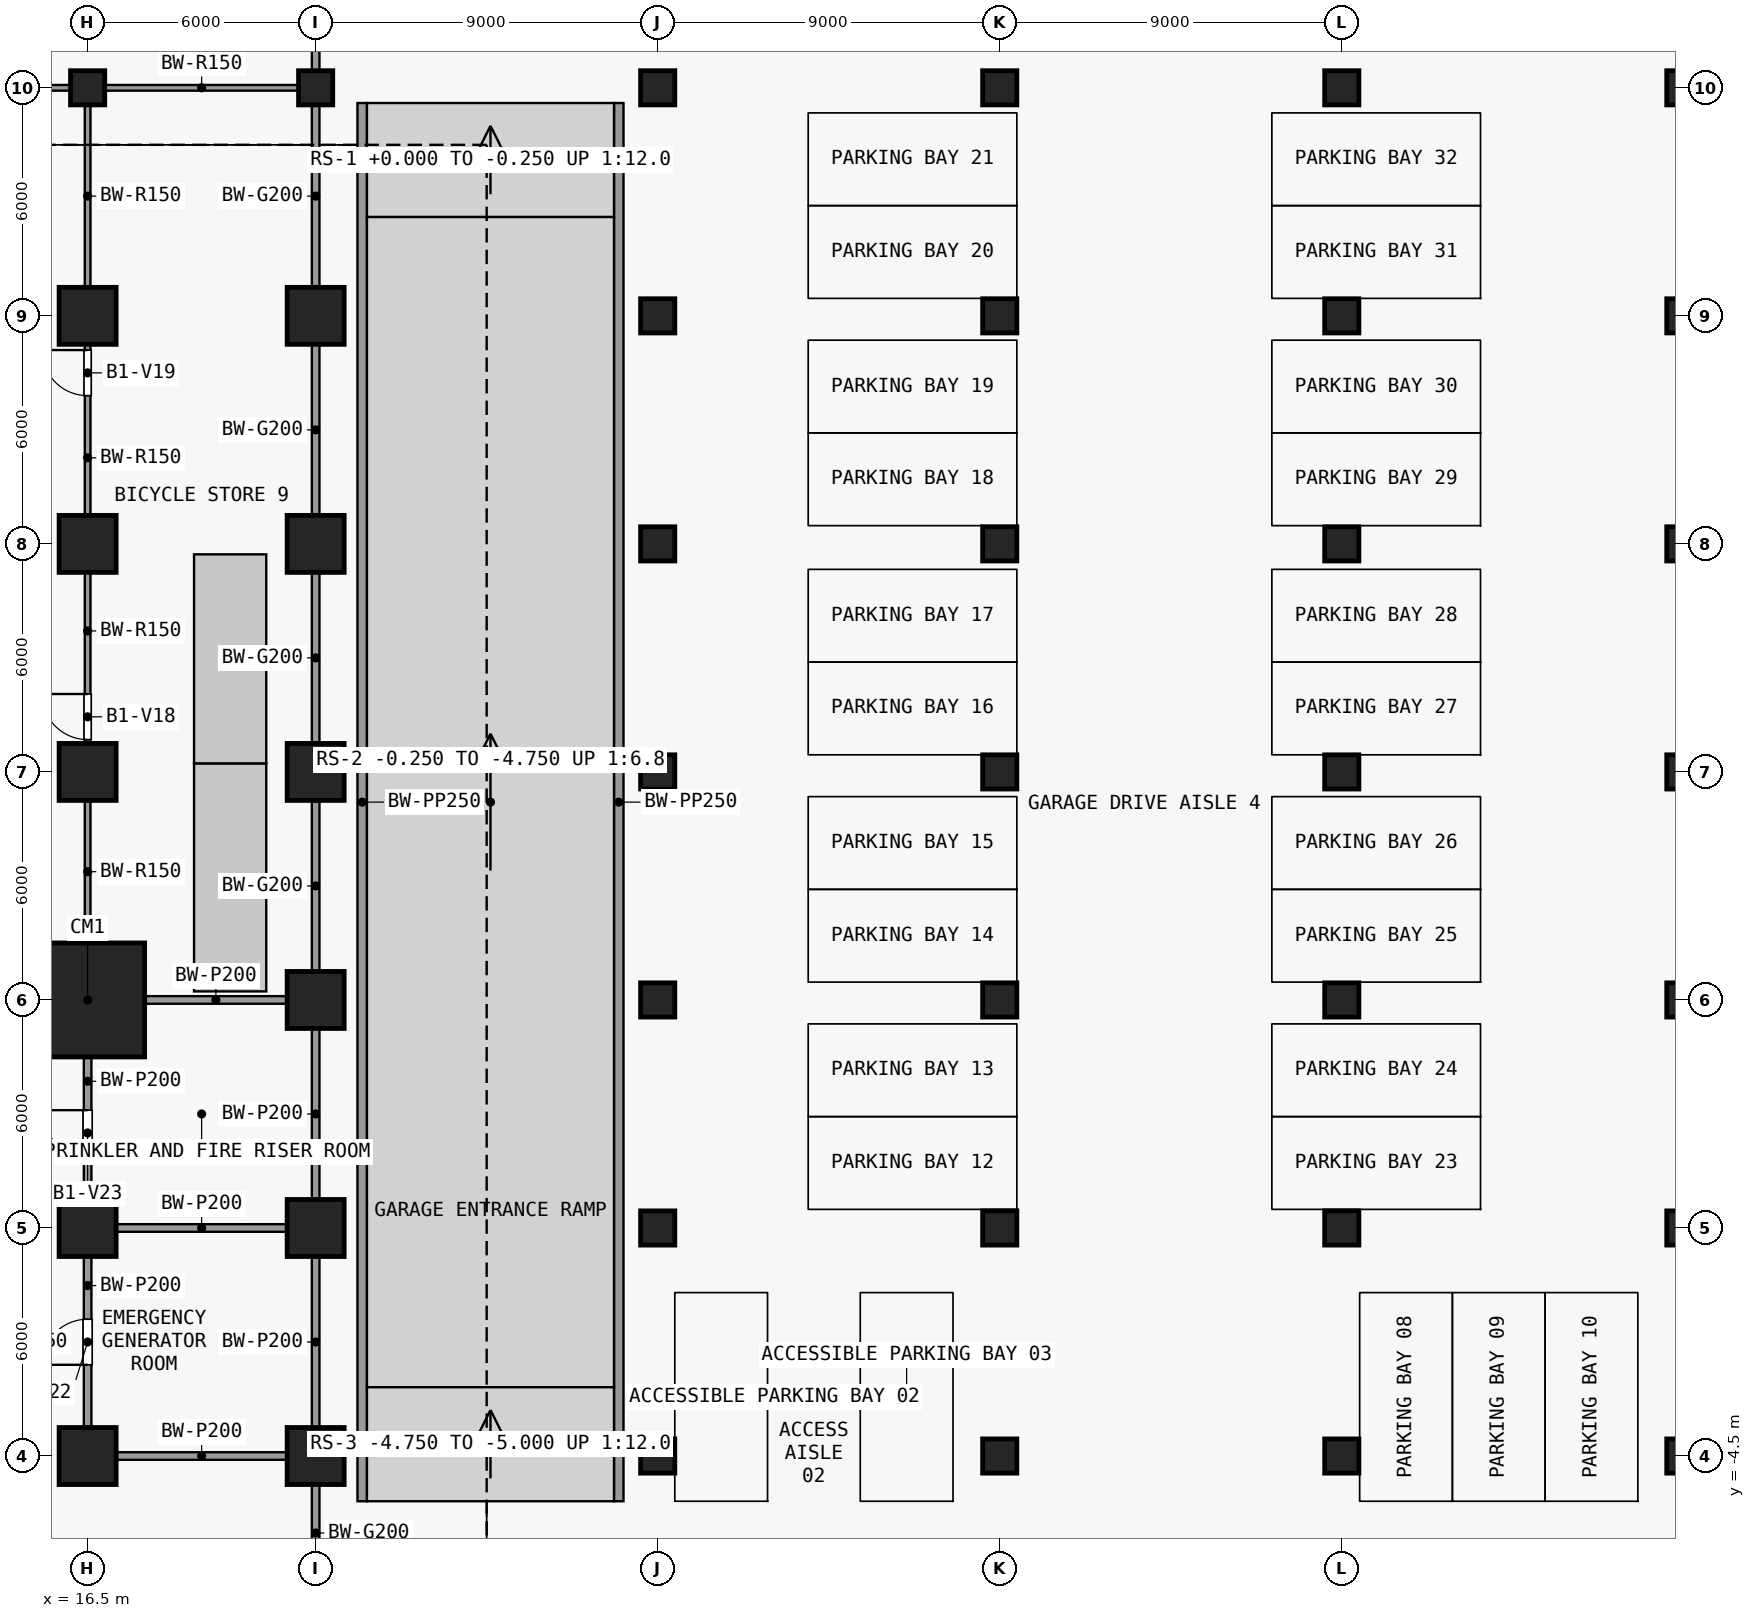
"""IFC4 building model, lengths in metres.
Left out: names, types, materials, properties, quantities, classifications, styles, units other than length and angle.
Written with IfcOpenShell. Run it as: python <this file> out.ifc"""

import sys

from ifc_helpers import new_model, si_unit, direction, frame, frame_2d, origin, origin_2d, place, context, subcontext, project, spatial, polyline, rectangle, outline, extrude, element, fill, save


model = new_model("IFC4")
c1 = context("Model", 3, precision=1e-05, world=origin(), true_north=direction((0.0, 1.0)))
c2 = subcontext(c1, "Body", "Model", "MODEL_VIEW")
j1 = project(units=[si_unit("LENGTHUNIT", "METRE"), si_unit("PLANEANGLEUNIT", "RADIAN")], contexts=[c1])
p1 = place(None, origin())
s1 = spatial("IfcSite", under=j1, at=p1, CompositionType="ELEMENT")
p2 = place(p1, origin())
s2 = spatial("IfcBuilding", under=s1, at=p2, CompositionType="ELEMENT")
p3 = place(p2, frame((0.0, 0.0, -5.0)))
s3 = spatial("IfcBuildingStorey", under=s2, at=p3, CompositionType="ELEMENT", Elevation=-5.0)
for number, where, z_axis, x_axis in (
    (1, (16.5, -4.5, 0.0), (0.0, 0.0, 1.0), (1.0, 0.0, 0.0)),
    (2, (16.5, 1.5, 0.0), (0.0, 0.0, 1.0), (1.0, 0.0, 0.0)),
):
    element("IfcColumn", number, at=place(p3, frame(where, z_axis=z_axis, x_axis=x_axis)), inside=s3, PredefinedType="COLUMN", context=c2, shape_type="SweptSolid", body=[
        extrude(rectangle(XDim=1.5, YDim=1.5, at=origin_2d()), origin(), (0.0, 0.0, 1.0), 5.0),
    ])
p4 = place(p3, frame((16.5, 7.5, 0.0), z_axis=(0.0, 0.0, 1.0), x_axis=(1.0, 0.0, 0.0)))
e3 = element("IfcColumn", 3, at=p4, inside=s3, PredefinedType="COLUMN", context=c2, shape_type="SweptSolid", body=[
    extrude(rectangle(XDim=3.0, YDim=3.0, at=origin_2d()), origin(), (0.0, 0.0, 1.0), 5.0),
])
for number, where, z_axis, x_axis in (
    (4, (16.5, 13.5, 0.0), (0.0, 0.0, 1.0), (1.0, 0.0, 0.0)),
    (5, (16.5, 19.5, 0.0), (0.0, 0.0, 1.0), (1.0, 0.0, 0.0)),
    (6, (16.5, 25.5, 0.0), (0.0, 0.0, 1.0), (1.0, 0.0, 0.0)),
):
    element("IfcColumn", number, at=place(p3, frame(where, z_axis=z_axis, x_axis=x_axis)), inside=s3, PredefinedType="COLUMN", context=c2, shape_type="SweptSolid", body=[
        extrude(rectangle(XDim=1.5, YDim=1.5, at=origin_2d()), origin(), (0.0, 0.0, 1.0), 5.0),
    ])
p5 = place(p3, frame((16.5, 31.5, 0.0), z_axis=(0.0, 0.0, 1.0), x_axis=(1.0, 0.0, 0.0)))
e7 = element("IfcColumn", 7, at=p5, inside=s3, PredefinedType="COLUMN", context=c2, shape_type="SweptSolid", body=[
    extrude(rectangle(XDim=0.9, YDim=0.9, at=origin_2d()), origin(), (0.0, 0.0, 1.0), 5.0),
])
for number, where, z_axis, x_axis in (
    (8, (22.5, -4.5, 0.0), (0.0, 0.0, 1.0), (1.0, 0.0, 0.0)),
    (9, (22.5, 1.5, 0.0), (0.0, 0.0, 1.0), (1.0, 0.0, 0.0)),
    (10, (22.5, 7.5, 0.0), (0.0, 0.0, 1.0), (1.0, 0.0, 0.0)),
    (11, (22.5, 13.5, 0.0), (0.0, 0.0, 1.0), (1.0, 0.0, 0.0)),
    (12, (22.5, 19.5, 0.0), (0.0, 0.0, 1.0), (1.0, 0.0, 0.0)),
    (13, (22.5, 25.5, 0.0), (0.0, 0.0, 1.0), (1.0, 0.0, 0.0)),
):
    element("IfcColumn", number, at=place(p3, frame(where, z_axis=z_axis, x_axis=x_axis)), inside=s3, PredefinedType="COLUMN", context=c2, shape_type="SweptSolid", body=[
        extrude(rectangle(XDim=1.5, YDim=1.5, at=origin_2d()), origin(), (0.0, 0.0, 1.0), 5.0),
    ])
for number, where, z_axis, x_axis in (
    (14, (22.5, 31.5, 0.0), (0.0, 0.0, 1.0), (1.0, 0.0, 0.0)),
    (15, (31.5, -4.5, 0.0), (0.0, 0.0, 1.0), (1.0, 0.0, 0.0)),
    (16, (31.5, 1.5, 0.0), (0.0, 0.0, 1.0), (1.0, 0.0, 0.0)),
    (17, (31.5, 7.5, 0.0), (0.0, 0.0, 1.0), (1.0, 0.0, 0.0)),
    (18, (31.5, 13.5, 0.0), (0.0, 0.0, 1.0), (1.0, 0.0, 0.0)),
    (19, (31.5, 19.5, 0.0), (0.0, 0.0, 1.0), (1.0, 0.0, 0.0)),
    (20, (31.5, 25.5, 0.0), (0.0, 0.0, 1.0), (1.0, 0.0, 0.0)),
    (21, (31.5, 31.5, 0.0), (0.0, 0.0, 1.0), (1.0, 0.0, 0.0)),
    (22, (40.5, -4.5, 0.0), (0.0, 0.0, 1.0), (1.0, 0.0, 0.0)),
    (23, (40.5, 1.5, 0.0), (0.0, 0.0, 1.0), (1.0, 0.0, 0.0)),
    (24, (40.5, 7.5, 0.0), (0.0, 0.0, 1.0), (1.0, 0.0, 0.0)),
    (25, (40.5, 13.5, 0.0), (0.0, 0.0, 1.0), (1.0, 0.0, 0.0)),
    (26, (40.5, 19.5, 0.0), (0.0, 0.0, 1.0), (1.0, 0.0, 0.0)),
    (27, (40.5, 25.5, 0.0), (0.0, 0.0, 1.0), (1.0, 0.0, 0.0)),
    (28, (40.5, 31.5, 0.0), (0.0, 0.0, 1.0), (1.0, 0.0, 0.0)),
    (29, (49.5, -4.5, 0.0), (0.0, 0.0, 1.0), (1.0, 0.0, 0.0)),
    (30, (49.5, 1.5, 0.0), (0.0, 0.0, 1.0), (1.0, 0.0, 0.0)),
    (31, (49.5, 7.5, 0.0), (0.0, 0.0, 1.0), (1.0, 0.0, 0.0)),
    (32, (49.5, 13.5, 0.0), (0.0, 0.0, 1.0), (1.0, 0.0, 0.0)),
    (33, (49.5, 19.5, 0.0), (0.0, 0.0, 1.0), (1.0, 0.0, 0.0)),
    (34, (49.5, 25.5, 0.0), (0.0, 0.0, 1.0), (1.0, 0.0, 0.0)),
    (35, (49.5, 31.5, 0.0), (0.0, 0.0, 1.0), (1.0, 0.0, 0.0)),
    (36, (58.5, -4.5, 0.0), (0.0, 0.0, 1.0), (1.0, 0.0, 0.0)),
    (37, (58.5, 1.5, 0.0), (0.0, 0.0, 1.0), (1.0, 0.0, 0.0)),
    (38, (58.5, 7.5, 0.0), (0.0, 0.0, 1.0), (1.0, 0.0, 0.0)),
    (39, (58.5, 13.5, 0.0), (0.0, 0.0, 1.0), (1.0, 0.0, 0.0)),
    (40, (58.5, 19.5, 0.0), (0.0, 0.0, 1.0), (1.0, 0.0, 0.0)),
    (41, (58.5, 25.5, 0.0), (0.0, 0.0, 1.0), (1.0, 0.0, 0.0)),
    (42, (58.5, 31.5, 0.0), (0.0, 0.0, 1.0), (1.0, 0.0, 0.0)),
):
    element("IfcColumn", number, at=place(p3, frame(where, z_axis=z_axis, x_axis=x_axis)), inside=s3, PredefinedType="COLUMN", context=c2, shape_type="SweptSolid", body=[
        extrude(rectangle(XDim=0.9, YDim=0.9, at=origin_2d()), origin(), (0.0, 0.0, 1.0), 5.0),
    ])
for number, where, z_axis, x_axis in (
    (43, (23.725, 31.1, 0.0), (0.0, 0.0, 1.0), (0.0, -1.0, 0.0)),
    (44, (30.475, 31.1, 0.0), (0.0, 0.0, 1.0), (0.0, -1.0, 0.0)),
):
    element("IfcWall", number, at=place(p3, frame(where, z_axis=z_axis, x_axis=x_axis)), inside=s3, PredefinedType="SOLIDWALL", context=c2, shape_type="SweptSolid", body=[
        extrude(outline(polyline([(0.0, 0.0), (36.79, 0.0), (36.79, 1.1), (33.79, 1.35), (3.0, 5.85), (0.0, 6.1), (0.0, 0.0)])), frame((0.0, 0.125, 0.0), z_axis=(0.0, -1.0, 0.0), x_axis=(1.0, 0.0, 0.0)), (0.0, 0.0, 1.0), 0.25),
    ])
for number, where, z_axis, x_axis in (
    (45, (17.25, -4.5, 0.0), (0.0, 0.0, 1.0), (1.0, 0.0, 0.0)),
    (46, (17.25, 1.5, 0.0), (0.0, 0.0, 1.0), (1.0, 0.0, 0.0)),
):
    element("IfcWall", number, at=place(p3, frame(where, z_axis=z_axis, x_axis=x_axis)), inside=s3, PredefinedType="SOLIDWALL", context=c2, shape_type="SweptSolid", body=[
        extrude(rectangle(XDim=4.5, YDim=0.2, at=frame_2d((2.25, 0.0))), origin(), (0.0, 0.0, 1.0), 4.55),
    ])
p6 = place(p3, frame((18.0, 7.5, 0.0), z_axis=(0.0, 0.0, 1.0), x_axis=(1.0, 0.0, 0.0)))
e47 = element("IfcWall", 47, at=p6, inside=s3, PredefinedType="SOLIDWALL", context=c2, shape_type="SweptSolid", body=[
    extrude(rectangle(XDim=3.75, YDim=0.2, at=frame_2d((1.875, 0.0))), origin(), (0.0, 0.0, 1.0), 4.55),
])
for number, where, z_axis, x_axis in (
    (48, (10.95, 31.5, 0.0), (0.0, 0.0, 1.0), (1.0, 0.0, 0.0)),
    (49, (16.95, 31.5, 0.0), (0.0, 0.0, 1.0), (1.0, 0.0, 0.0)),
):
    element("IfcWall", number, at=place(p3, frame(where, z_axis=z_axis, x_axis=x_axis)), inside=s3, PredefinedType="PARTITIONING", context=c2, shape_type="SweptSolid", body=[
        extrude(rectangle(XDim=5.1, YDim=0.15, at=frame_2d((2.55, 0.0))), origin(), (0.0, 0.0, 1.0), 4.55),
    ])
p7 = place(p3, frame((16.5, -3.75, 0.0), z_axis=(0.0, 0.0, 1.0), x_axis=(0.0, 1.0, 0.0)))
e50 = element("IfcWall", 50, at=p7, inside=s3, PredefinedType="SOLIDWALL", context=c2, shape_type="SweptSolid", body=[
    extrude(rectangle(XDim=4.5, YDim=0.2, at=frame_2d((2.25, 0.0))), origin(), (0.0, 0.0, 1.0), 4.55),
])
p8 = place(p7, frame((1.65, 0.0, 0.0)))
e51 = element("IfcOpeningElement", 51, at=p8, cuts=e50, PredefinedType="OPENING", context=c2, shape_type="SweptSolid", body=[
    extrude(rectangle(XDim=1.2, YDim=2.1, at=frame_2d((0.6, 1.05))), frame((0.0, 0.11, 0.0), z_axis=(0.0, -1.0, 0.0), x_axis=(1.0, 0.0, 0.0)), (0.0, 0.0, 1.0), 0.22),
])
p9 = place(p3, frame((16.5, 2.25, 0.0), z_axis=(0.0, 0.0, 1.0), x_axis=(0.0, 1.0, 0.0)))
e52 = element("IfcWall", 52, at=p9, inside=s3, PredefinedType="SOLIDWALL", context=c2, shape_type="SweptSolid", body=[
    extrude(rectangle(XDim=3.75, YDim=0.2, at=frame_2d((1.875, 0.0))), origin(), (0.0, 0.0, 1.0), 4.55),
])
p10 = place(p9, frame((1.15, 0.0, 0.0)))
e53 = element("IfcOpeningElement", 53, at=p10, cuts=e52, PredefinedType="OPENING", context=c2, shape_type="SweptSolid", body=[
    extrude(rectangle(XDim=1.2, YDim=2.1, at=frame_2d((0.6, 1.05))), frame((0.0, 0.11, 0.0), z_axis=(0.0, -1.0, 0.0), x_axis=(1.0, 0.0, 0.0)), (0.0, 0.0, 1.0), 0.22),
])
p11 = place(p3, frame((16.5, 9.0, 0.0), z_axis=(0.0, 0.0, 1.0), x_axis=(0.0, 1.0, 0.0)))
e54 = element("IfcWall", 54, at=p11, inside=s3, PredefinedType="PARTITIONING", context=c2, shape_type="SweptSolid", body=[
    extrude(rectangle(XDim=3.75, YDim=0.15, at=frame_2d((1.875, 0.0))), origin(), (0.0, 0.0, 1.0), 4.55),
])
p12 = place(p3, frame((16.5, 14.25, 0.0), z_axis=(0.0, 0.0, 1.0), x_axis=(0.0, 1.0, 0.0)))
e55 = element("IfcWall", 55, at=p12, inside=s3, PredefinedType="PARTITIONING", context=c2, shape_type="SweptSolid", body=[
    extrude(rectangle(XDim=4.5, YDim=0.15, at=frame_2d((2.25, 0.0))), origin(), (0.0, 0.0, 1.0), 4.55),
])
p13 = place(p12, frame((0.1, 0.0, 0.0)))
e56 = element("IfcOpeningElement", 56, at=p13, cuts=e55, PredefinedType="OPENING", context=c2, shape_type="SweptSolid", body=[
    extrude(rectangle(XDim=1.2, YDim=2.1, at=frame_2d((0.6, 1.05))), frame((0.0, 0.085, 0.0), z_axis=(0.0, -1.0, 0.0), x_axis=(1.0, 0.0, 0.0)), (0.0, 0.0, 1.0), 0.17),
])
p14 = place(p3, frame((16.5, 20.25, 0.0), z_axis=(0.0, 0.0, 1.0), x_axis=(0.0, 1.0, 0.0)))
e57 = element("IfcWall", 57, at=p14, inside=s3, PredefinedType="PARTITIONING", context=c2, shape_type="SweptSolid", body=[
    extrude(rectangle(XDim=4.5, YDim=0.15, at=frame_2d((2.25, 0.0))), origin(), (0.0, 0.0, 1.0), 4.55),
])
p15 = place(p14, frame((3.15, 0.0, 0.0)))
e58 = element("IfcOpeningElement", 58, at=p15, cuts=e57, PredefinedType="OPENING", context=c2, shape_type="SweptSolid", body=[
    extrude(rectangle(XDim=1.2, YDim=2.1, at=frame_2d((0.6, 1.05))), frame((0.0, 0.085, 0.0), z_axis=(0.0, -1.0, 0.0), x_axis=(1.0, 0.0, 0.0)), (0.0, 0.0, 1.0), 0.17),
])
p16 = place(p3, frame((16.5, 26.25, 0.0), z_axis=(0.0, 0.0, 1.0), x_axis=(0.0, 1.0, 0.0)))
e59 = element("IfcWall", 59, at=p16, inside=s3, PredefinedType="PARTITIONING", context=c2, shape_type="SweptSolid", body=[
    extrude(rectangle(XDim=4.8, YDim=0.15, at=frame_2d((2.4, 0.0))), origin(), (0.0, 0.0, 1.0), 4.55),
])
p17 = place(p3, frame((22.5, -7.8, 0.0), z_axis=(0.0, 0.0, 1.0), x_axis=(0.0, 1.0, 0.0)))
e60 = element("IfcWall", 60, at=p17, inside=s3, PredefinedType="SOLIDWALL", context=c2, shape_type="SweptSolid", body=[
    extrude(rectangle(XDim=2.55, YDim=0.2, at=frame_2d((1.275, 0.0))), origin(), (0.0, 0.0, 1.0), 4.55),
])
for number, where, z_axis, x_axis in (
    (61, (22.5, -3.75, 0.0), (0.0, 0.0, 1.0), (0.0, 1.0, 0.0)),
    (62, (22.5, 2.25, 0.0), (0.0, 0.0, 1.0), (0.0, 1.0, 0.0)),
    (63, (22.5, 8.25, 0.0), (0.0, 0.0, 1.0), (0.0, 1.0, 0.0)),
    (64, (22.5, 14.25, 0.0), (0.0, 0.0, 1.0), (0.0, 1.0, 0.0)),
    (65, (22.5, 20.25, 0.0), (0.0, 0.0, 1.0), (0.0, 1.0, 0.0)),
):
    element("IfcWall", number, at=place(p3, frame(where, z_axis=z_axis, x_axis=x_axis)), inside=s3, PredefinedType="SOLIDWALL", context=c2, shape_type="SweptSolid", body=[
        extrude(rectangle(XDim=4.5, YDim=0.2, at=frame_2d((2.25, 0.0))), origin(), (0.0, 0.0, 1.0), 4.55),
    ])
p18 = place(p3, frame((22.5, 26.25, 0.0), z_axis=(0.0, 0.0, 1.0), x_axis=(0.0, 1.0, 0.0)))
e66 = element("IfcWall", 66, at=p18, inside=s3, PredefinedType="SOLIDWALL", context=c2, shape_type="SweptSolid", body=[
    extrude(rectangle(XDim=4.8, YDim=0.2, at=frame_2d((2.4, 0.0))), origin(), (0.0, 0.0, 1.0), 4.55),
])
p19 = place(p3, frame((22.5, 31.95, 0.0), z_axis=(0.0, 0.0, 1.0), x_axis=(0.0, 1.0, 0.0)))
e67 = element("IfcWall", 67, at=p19, inside=s3, PredefinedType="SOLIDWALL", context=c2, shape_type="SweptSolid", body=[
    extrude(rectangle(XDim=1.95, YDim=0.2, at=frame_2d((0.975, 0.0))), origin(), (0.0, 0.0, 1.0), 4.55),
])
p20 = place(p13, origin())
e68 = element("IfcDoor", 68, at=p20, inside=s3, OperationType="SINGLE_SWING_RIGHT", PredefinedType="DOOR", context=c2, shape_type="SweptSolid", body=[
    extrude(rectangle(XDim=1.2, YDim=2.1, at=frame_2d((0.6, 1.05))), frame((0.0, 0.025, 0.0), z_axis=(0.0, -1.0, 0.0), x_axis=(1.0, 0.0, 0.0)), (0.0, 0.0, 1.0), 0.05),
])
fill(e56, e68)
p21 = place(p15, origin())
e69 = element("IfcDoor", 69, at=p21, inside=s3, OperationType="SINGLE_SWING_RIGHT", PredefinedType="DOOR", context=c2, shape_type="SweptSolid", body=[
    extrude(rectangle(XDim=1.2, YDim=2.1, at=frame_2d((0.6, 1.05))), frame((0.0, 0.025, 0.0), z_axis=(0.0, -1.0, 0.0), x_axis=(1.0, 0.0, 0.0)), (0.0, 0.0, 1.0), 0.05),
])
fill(e58, e69)
p22 = place(p8, origin())
e70 = element("IfcDoor", 70, at=p22, inside=s3, OperationType="SINGLE_SWING_LEFT", PredefinedType="DOOR", context=c2, shape_type="SweptSolid", body=[
    extrude(rectangle(XDim=1.2, YDim=2.1, at=frame_2d((0.6, 1.05))), frame((0.0, 0.025, 0.0), z_axis=(0.0, -1.0, 0.0), x_axis=(1.0, 0.0, 0.0)), (0.0, 0.0, 1.0), 0.05),
])
fill(e51, e70)
p23 = place(p10, origin())
e71 = element("IfcDoor", 71, at=p23, inside=s3, OperationType="SINGLE_SWING_RIGHT", PredefinedType="DOOR", context=c2, shape_type="SweptSolid", body=[
    extrude(rectangle(XDim=1.2, YDim=2.1, at=frame_2d((0.6, 1.05))), frame((0.0, 0.025, 0.0), z_axis=(0.0, -1.0, 0.0), x_axis=(1.0, 0.0, 0.0)), (0.0, 0.0, 1.0), 0.05),
])
fill(e53, e71)
save(model, sys.argv[1])
